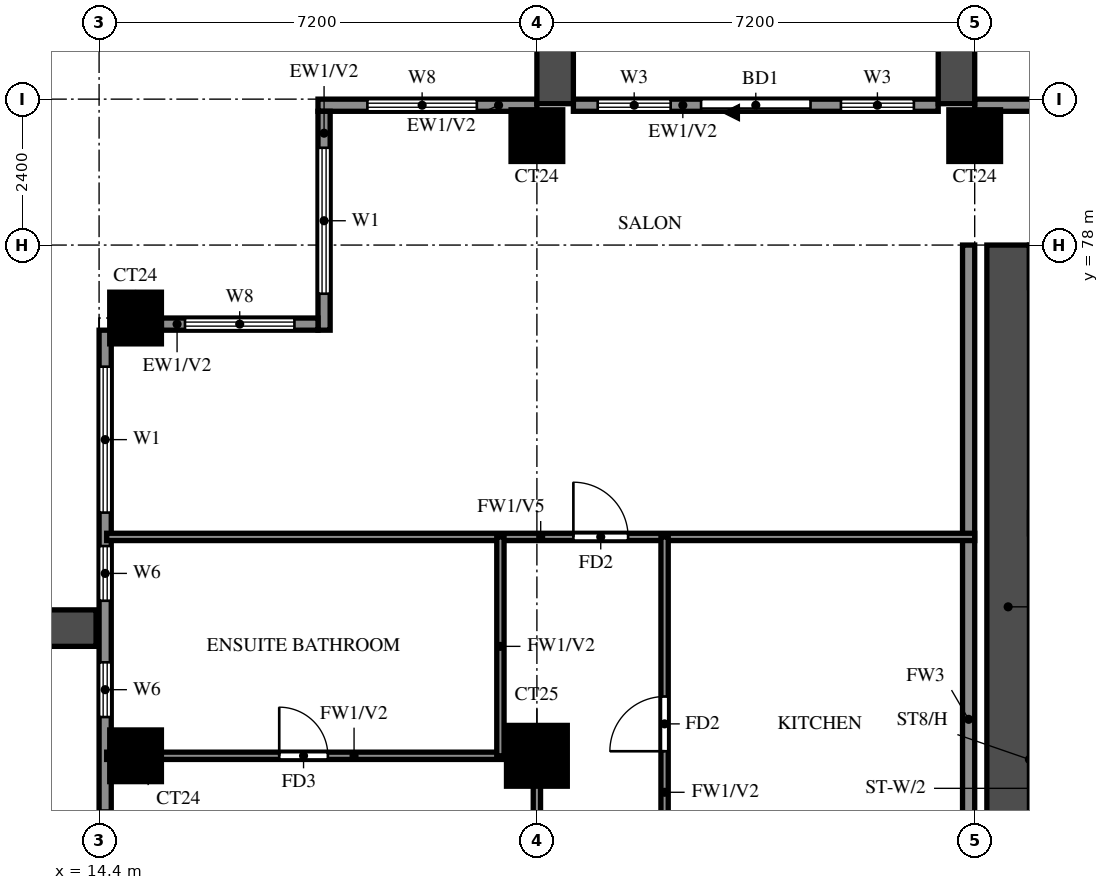
"""IFC4 building model, lengths in metres.
Left out: names, types, materials, properties, quantities, classifications, styles, units other than length and angle.
Written with IfcOpenShell. Run it as: python <this file> out.ifc"""

import sys

from ifc_helpers import new_model, si_unit, direction, frame, frame_2d, origin, origin_2d, place, context, subcontext, project, spatial, rectangle, extrude, source, transform, mapped, element, fill, save


model = new_model("IFC4")
c1 = context("Model", 3, precision=1e-05, world=origin(), true_north=direction((0.0, 1.0)))
c2 = subcontext(c1, "Body", "Model", "MODEL_VIEW")
j1 = project(units=[si_unit("LENGTHUNIT", "METRE"), si_unit("PLANEANGLEUNIT", "RADIAN")], contexts=[c1])
p1 = place(None, origin())
s1 = spatial("IfcSite", under=j1, at=p1, CompositionType="ELEMENT")
p2 = place(p1, origin())
s2 = spatial("IfcBuilding", under=s1, at=p2, CompositionType="ELEMENT")
p3 = place(p2, frame((0.0, 0.0, 150.0)))
s3 = spatial("IfcBuildingStorey", under=s2, at=p3, CompositionType="ELEMENT", Elevation=150.0)
m1 = source(origin(), c2, "Body", "SweptSolid", [
    extrude(rectangle(XDim=0.85, YDim=0.85, at=origin_2d()), origin(), (0.0, 0.0, 1.0), 3.2),
])
p4 = place(p3, frame((15.0, 69.6, 0.0), z_axis=(0.0, 0.0, 1.0), x_axis=(1.0, 0.0, 0.0)))
e1 = element("IfcColumn", 1, at=p4, inside=s3, PredefinedType="COLUMN", context=c2, shape_type="MappedRepresentation", body=[
    mapped(m1, transform((0.0, 0.0, 0.0))),
])
m2 = source(origin(), c2, "Body", "SweptSolid", [
    extrude(rectangle(XDim=1.0, YDim=1.0, at=origin_2d()), origin(), (0.0, 0.0, 1.0), 3.2),
])
p5 = place(p3, frame((21.6, 69.6, 0.0), z_axis=(0.0, 0.0, 1.0), x_axis=(1.0, 0.0, 0.0)))
e2 = element("IfcColumn", 2, at=p5, inside=s3, PredefinedType="COLUMN", context=c2, shape_type="MappedRepresentation", body=[
    mapped(m2, transform((0.0, 0.0, 0.0))),
])
for number, where, z_axis, x_axis in (
    (3, (15.0, 76.8, 0.0), (0.0, 0.0, 1.0), (1.0, 0.0, 0.0)),
    (4, (21.6, 79.8, 0.0), (0.0, 0.0, 1.0), (1.0, 0.0, 0.0)),
    (5, (28.8, 79.8, 0.0), (0.0, 0.0, 1.0), (1.0, 0.0, 0.0)),
):
    element("IfcColumn", number, at=place(p3, frame(where, z_axis=z_axis, x_axis=x_axis)), inside=s3, PredefinedType="COLUMN", context=c2, shape_type="MappedRepresentation", body=[
        mapped(m1, transform((0.0, 0.0, 0.0))),
    ])
p6 = place(p3, frame((29.35, 66.1, 0.0), z_axis=(0.0, 0.0, 1.0), x_axis=(0.0, 1.0, 0.0)))
e6 = element("IfcWall", 6, at=p6, inside=s3, PredefinedType="SHEAR", context=c2, shape_type="SweptSolid", body=[
    extrude(rectangle(XDim=11.9, YDim=0.7, at=frame_2d((5.95, 0.0))), origin(), (0.0, 0.0, 1.0), 3.2),
])
p7 = place(p3, frame((82.6, 80.3, 0.0), z_axis=(0.0, 0.0, 1.0), x_axis=(-1.0, 0.0, 0.0)))
e7 = element("IfcWall", 7, at=p7, inside=s3, PredefinedType="SOLIDWALL", context=c2, shape_type="SweptSolid", body=[
    extrude(rectangle(XDim=53.8, YDim=0.2, at=frame_2d((26.9, 0.0))), origin(), (0.0, 0.0, 1.0), 3.2),
])
p8 = place(p7, frame((0.712, 0.0, 0.6)))
e8 = element("IfcOpeningElement", 8, at=p8, cuts=e7, PredefinedType="OPENING", context=c2, shape_type="SweptSolid", body=[
    extrude(rectangle(XDim=1.8, YDim=2.4, at=frame_2d((0.9, 1.2))), frame((0.0, 0.11, 0.0), z_axis=(0.0, -1.0, 0.0), x_axis=(1.0, 0.0, 0.0)), (0.0, 0.0, 1.0), 0.22),
])
p9 = place(p7, frame((4.358, 0.0, 0.6)))
e9 = element("IfcOpeningElement", 9, at=p9, cuts=e7, PredefinedType="OPENING", context=c2, shape_type="SweptSolid", body=[
    extrude(rectangle(XDim=2.4, YDim=2.4, at=frame_2d((1.2, 1.2))), frame((0.0, 0.11, 0.0), z_axis=(0.0, -1.0, 0.0), x_axis=(1.0, 0.0, 0.0)), (0.0, 0.0, 1.0), 0.22),
])
p10 = place(p7, frame((7.242, 0.0, 0.6)))
e10 = element("IfcOpeningElement", 10, at=p10, cuts=e7, PredefinedType="OPENING", context=c2, shape_type="SweptSolid", body=[
    extrude(rectangle(XDim=2.4, YDim=2.4, at=frame_2d((1.2, 1.2))), frame((0.0, 0.11, 0.0), z_axis=(0.0, -1.0, 0.0), x_axis=(1.0, 0.0, 0.0)), (0.0, 0.0, 1.0), 0.22),
])
p11 = place(p3, frame((28.2, 80.3, 0.0), z_axis=(0.0, 0.0, 1.0), x_axis=(-1.0, 0.0, 0.0)))
e11 = element("IfcWall", 11, at=p11, inside=s3, PredefinedType="SOLIDWALL", context=c2, shape_type="SweptSolid", body=[
    extrude(rectangle(XDim=6.0, YDim=0.2, at=frame_2d((3.0, 0.0))), origin(), (0.0, 0.0, 1.0), 3.2),
])
p12 = place(p11, frame((2.1, 0.0, 0.0)))
e12 = element("IfcOpeningElement", 12, at=p12, cuts=e11, PredefinedType="OPENING", context=c2, shape_type="SweptSolid", body=[
    extrude(rectangle(XDim=1.8, YDim=2.4, at=frame_2d((0.9, 1.2))), frame((0.0, 0.11, 0.0), z_axis=(0.0, -1.0, 0.0), x_axis=(1.0, 0.0, 0.0)), (0.0, 0.0, 1.0), 0.22),
])
p13 = place(p11, frame((0.4, 0.0, 0.6)))
e13 = element("IfcOpeningElement", 13, at=p13, cuts=e11, PredefinedType="OPENING", context=c2, shape_type="SweptSolid", body=[
    extrude(rectangle(XDim=1.2, YDim=2.4, at=frame_2d((0.6, 1.2))), frame((0.0, 0.11, 0.0), z_axis=(0.0, -1.0, 0.0), x_axis=(1.0, 0.0, 0.0)), (0.0, 0.0, 1.0), 0.22),
])
p14 = place(p11, frame((4.4, 0.0, 0.6)))
e14 = element("IfcOpeningElement", 14, at=p14, cuts=e11, PredefinedType="OPENING", context=c2, shape_type="SweptSolid", body=[
    extrude(rectangle(XDim=1.2, YDim=2.4, at=frame_2d((0.6, 1.2))), frame((0.0, 0.11, 0.0), z_axis=(0.0, -1.0, 0.0), x_axis=(1.0, 0.0, 0.0)), (0.0, 0.0, 1.0), 0.22),
])
p15 = place(p3, frame((21.6, 80.3, 0.0), z_axis=(0.0, 0.0, 1.0), x_axis=(-1.0, 0.0, 0.0)))
e15 = element("IfcWall", 15, at=p15, inside=s3, PredefinedType="SOLIDWALL", context=c2, shape_type="SweptSolid", body=[
    extrude(rectangle(XDim=3.6, YDim=0.2, at=frame_2d((1.8, 0.0))), origin(), (0.0, 0.0, 1.0), 3.2),
])
p16 = place(p15, frame((0.988, 0.0, 0.6)))
e16 = element("IfcOpeningElement", 16, at=p16, cuts=e15, PredefinedType="OPENING", context=c2, shape_type="SweptSolid", body=[
    extrude(rectangle(XDim=1.8, YDim=2.4, at=frame_2d((0.9, 1.2))), frame((0.0, 0.11, 0.0), z_axis=(0.0, -1.0, 0.0), x_axis=(1.0, 0.0, 0.0)), (0.0, 0.0, 1.0), 0.22),
])
p17 = place(p3, frame((18.1, 80.2, 0.0), z_axis=(0.0, 0.0, 1.0), x_axis=(0.0, -1.0, 0.0)))
e17 = element("IfcWall", 17, at=p17, inside=s3, PredefinedType="SOLIDWALL", context=c2, shape_type="SweptSolid", body=[
    extrude(rectangle(XDim=3.6, YDim=0.2, at=frame_2d((1.8, 0.0))), origin(), (0.0, 0.0, 1.0), 3.2),
])
p18 = place(p17, frame((0.6, 0.0, 0.6)))
e18 = element("IfcOpeningElement", 18, at=p18, cuts=e17, PredefinedType="OPENING", context=c2, shape_type="SweptSolid", body=[
    extrude(rectangle(XDim=2.4, YDim=2.4, at=frame_2d((1.2, 1.2))), frame((0.0, 0.11, 0.0), z_axis=(0.0, -1.0, 0.0), x_axis=(1.0, 0.0, 0.0)), (0.0, 0.0, 1.0), 0.22),
])
p19 = place(p3, frame((18.0, 76.7, 0.0), z_axis=(0.0, 0.0, 1.0), x_axis=(-1.0, 0.0, 0.0)))
e19 = element("IfcWall", 19, at=p19, inside=s3, PredefinedType="SOLIDWALL", context=c2, shape_type="SweptSolid", body=[
    extrude(rectangle(XDim=2.575, YDim=0.2, at=frame_2d((1.288, 0.0))), origin(), (0.0, 0.0, 1.0), 3.2),
])
p20 = place(p19, frame((0.387, 0.0, 0.6)))
e20 = element("IfcOpeningElement", 20, at=p20, cuts=e19, PredefinedType="OPENING", context=c2, shape_type="SweptSolid", body=[
    extrude(rectangle(XDim=1.8, YDim=2.4, at=frame_2d((0.9, 1.2))), frame((0.0, 0.11, 0.0), z_axis=(0.0, -1.0, 0.0), x_axis=(1.0, 0.0, 0.0)), (0.0, 0.0, 1.0), 0.22),
])
p21 = place(p3, frame((14.5, 76.6, 0.0), z_axis=(0.0, 0.0, 1.0), x_axis=(0.0, -1.0, 0.0)))
e21 = element("IfcWall", 21, at=p21, inside=s3, PredefinedType="SOLIDWALL", context=c2, shape_type="SweptSolid", body=[
    extrude(rectangle(XDim=33.4, YDim=0.2, at=frame_2d((16.7, 0.0))), origin(), (0.0, 0.0, 1.0), 3.2),
])
p22 = place(p21, frame((7.9, 0.0, 0.0)))
e22 = element("IfcOpeningElement", 22, at=p22, cuts=e21, PredefinedType="OPENING", context=c2, shape_type="SweptSolid", body=[
    extrude(rectangle(XDim=1.8, YDim=2.4, at=frame_2d((0.9, 1.2))), frame((0.0, 0.11, 0.0), z_axis=(0.0, -1.0, 0.0), x_axis=(1.0, 0.0, 0.0)), (0.0, 0.0, 1.0), 0.22),
])
p23 = place(p21, frame((22.3, 0.0, 0.0)))
e23 = element("IfcOpeningElement", 23, at=p23, cuts=e21, PredefinedType="OPENING", context=c2, shape_type="SweptSolid", body=[
    extrude(rectangle(XDim=1.8, YDim=2.4, at=frame_2d((0.9, 1.2))), frame((0.0, 0.11, 0.0), z_axis=(0.0, -1.0, 0.0), x_axis=(1.0, 0.0, 0.0)), (0.0, 0.0, 1.0), 0.22),
])
p24 = place(p21, frame((29.887, 0.0, 0.6)))
e24 = element("IfcOpeningElement", 24, at=p24, cuts=e21, PredefinedType="OPENING", context=c2, shape_type="SweptSolid", body=[
    extrude(rectangle(XDim=2.4, YDim=2.4, at=frame_2d((1.2, 1.2))), frame((0.0, 0.11, 0.0), z_axis=(0.0, -1.0, 0.0), x_axis=(1.0, 0.0, 0.0)), (0.0, 0.0, 1.0), 0.22),
])
p25 = place(p21, frame((24.55, 0.0, 0.6)))
e25 = element("IfcOpeningElement", 25, at=p25, cuts=e21, PredefinedType="OPENING", context=c2, shape_type="SweptSolid", body=[
    extrude(rectangle(XDim=0.9, YDim=2.4, at=frame_2d((0.45, 1.2))), frame((0.0, 0.11, 0.0), z_axis=(0.0, -1.0, 0.0), x_axis=(1.0, 0.0, 0.0)), (0.0, 0.0, 1.0), 0.22),
])
p26 = place(p21, frame((26.312, 0.0, 0.6)))
e26 = element("IfcOpeningElement", 26, at=p26, cuts=e21, PredefinedType="OPENING", context=c2, shape_type="SweptSolid", body=[
    extrude(rectangle(XDim=1.8, YDim=2.4, at=frame_2d((0.9, 1.2))), frame((0.0, 0.11, 0.0), z_axis=(0.0, -1.0, 0.0), x_axis=(1.0, 0.0, 0.0)), (0.0, 0.0, 1.0), 0.22),
])
p27 = place(p21, frame((14.988, 0.0, 0.6)))
e27 = element("IfcOpeningElement", 27, at=p27, cuts=e21, PredefinedType="OPENING", context=c2, shape_type="SweptSolid", body=[
    extrude(rectangle(XDim=2.4, YDim=2.4, at=frame_2d((1.2, 1.2))), frame((0.0, 0.11, 0.0), z_axis=(0.0, -1.0, 0.0), x_axis=(1.0, 0.0, 0.0)), (0.0, 0.0, 1.0), 0.22),
])
p28 = place(p21, frame((17.95, 0.0, 1.5)))
e28 = element("IfcOpeningElement", 28, at=p28, cuts=e21, PredefinedType="OPENING", context=c2, shape_type="SweptSolid", body=[
    extrude(rectangle(XDim=0.9, YDim=0.9, at=frame_2d((0.45, 0.45))), frame((0.0, 0.11, 0.0), z_axis=(0.0, -1.0, 0.0), x_axis=(1.0, 0.0, 0.0)), (0.0, 0.0, 1.0), 0.22),
])
p29 = place(p21, frame((19.863, 0.0, 1.5)))
e29 = element("IfcOpeningElement", 29, at=p29, cuts=e21, PredefinedType="OPENING", context=c2, shape_type="SweptSolid", body=[
    extrude(rectangle(XDim=0.9, YDim=0.9, at=frame_2d((0.45, 0.45))), frame((0.0, 0.11, 0.0), z_axis=(0.0, -1.0, 0.0), x_axis=(1.0, 0.0, 0.0)), (0.0, 0.0, 1.0), 0.22),
])
p30 = place(p21, frame((11.913, 0.0, 0.6)))
e30 = element("IfcOpeningElement", 30, at=p30, cuts=e21, PredefinedType="OPENING", context=c2, shape_type="SweptSolid", body=[
    extrude(rectangle(XDim=1.8, YDim=2.4, at=frame_2d((0.9, 1.2))), frame((0.0, 0.11, 0.0), z_axis=(0.0, -1.0, 0.0), x_axis=(1.0, 0.0, 0.0)), (0.0, 0.0, 1.0), 0.22),
])
p31 = place(p21, frame((3.55, 0.0, 1.5)))
e31 = element("IfcOpeningElement", 31, at=p31, cuts=e21, PredefinedType="OPENING", context=c2, shape_type="SweptSolid", body=[
    extrude(rectangle(XDim=0.9, YDim=0.9, at=frame_2d((0.45, 0.45))), frame((0.0, 0.11, 0.0), z_axis=(0.0, -1.0, 0.0), x_axis=(1.0, 0.0, 0.0)), (0.0, 0.0, 1.0), 0.22),
])
p32 = place(p21, frame((5.462, 0.0, 1.5)))
e32 = element("IfcOpeningElement", 32, at=p32, cuts=e21, PredefinedType="OPENING", context=c2, shape_type="SweptSolid", body=[
    extrude(rectangle(XDim=0.9, YDim=0.9, at=frame_2d((0.45, 0.45))), frame((0.0, 0.11, 0.0), z_axis=(0.0, -1.0, 0.0), x_axis=(1.0, 0.0, 0.0)), (0.0, 0.0, 1.0), 0.22),
])
p33 = place(p21, frame((0.6, 0.0, 0.6)))
e33 = element("IfcOpeningElement", 33, at=p33, cuts=e21, PredefinedType="OPENING", context=c2, shape_type="SweptSolid", body=[
    extrude(rectangle(XDim=2.4, YDim=2.4, at=frame_2d((1.2, 1.2))), frame((0.0, 0.11, 0.0), z_axis=(0.0, -1.0, 0.0), x_axis=(1.0, 0.0, 0.0)), (0.0, 0.0, 1.0), 0.22),
])
for number, where, z_axis, x_axis in (
    (34, (28.5, 80.325, 0.0), (0.0, 0.0, 1.0), (0.0, 1.0, 0.0)),
    (35, (21.9, 80.325, 0.0), (0.0, 0.0, 1.0), (0.0, 1.0, 0.0)),
):
    element("IfcWall", number, at=place(p3, frame(where, z_axis=z_axis, x_axis=x_axis)), inside=s3, PredefinedType="SOLIDWALL", context=c2, shape_type="SweptSolid", body=[
        extrude(rectangle(XDim=2.775, YDim=0.6, at=frame_2d((1.388, 0.0))), origin(), (0.0, 0.0, 1.0), 2.85),
    ])
p34 = place(p3, frame((14.35, 71.7, 0.0), z_axis=(0.0, 0.0, 1.0), x_axis=(-1.0, 0.0, 0.0)))
e36 = element("IfcWall", 36, at=p34, inside=s3, PredefinedType="SOLIDWALL", context=c2, shape_type="SweptSolid", body=[
    extrude(rectangle(XDim=2.65, YDim=0.6, at=frame_2d((1.325, 0.0))), origin(), (0.0, 0.0, 1.0), 2.85),
])
p35 = place(p3, frame((28.7, 62.4, 0.0), z_axis=(0.0, 0.0, 1.0), x_axis=(0.0, 1.0, 0.0)))
e37 = element("IfcWall", 37, at=p35, inside=s3, PredefinedType="SOLIDWALL", context=c2, shape_type="SweptSolid", body=[
    extrude(rectangle(XDim=15.6, YDim=0.2, at=frame_2d((7.8, 0.0))), origin(), (0.0, 0.0, 1.0), 3.2),
])
p36 = place(p3, frame((14.525, 69.6, 0.0), z_axis=(0.0, 0.0, 1.0), x_axis=(1.0, 0.0, 0.0)))
e38 = element("IfcWall", 38, at=p36, inside=s3, PredefinedType="PARTITIONING", context=c2, shape_type="SweptSolid", body=[
    extrude(rectangle(XDim=7.075, YDim=0.12, at=frame_2d((3.538, 0.0))), origin(), (0.0, 0.0, 1.0), 3.2),
])
p37 = place(p36, frame((2.837, 0.0, 0.0)))
e39 = element("IfcOpeningElement", 39, at=p37, cuts=e38, PredefinedType="OPENING", context=c2, shape_type="SweptSolid", body=[
    extrude(rectangle(XDim=0.8, YDim=2.1, at=frame_2d((0.4, 1.05))), frame((0.0, 0.07, 0.0), z_axis=(0.0, -1.0, 0.0), x_axis=(1.0, 0.0, 0.0)), (0.0, 0.0, 1.0), 0.14),
])
p38 = place(p3, frame((14.525, 73.2, 0.0), z_axis=(0.0, 0.0, 1.0), x_axis=(1.0, 0.0, 0.0)))
e40 = element("IfcWall", 40, at=p38, inside=s3, PredefinedType="PARTITIONING", context=c2, shape_type="SweptSolid", body=[
    extrude(rectangle(XDim=14.275, YDim=0.12, at=frame_2d((7.138, 0.0))), origin(), (0.0, 0.0, 1.0), 2.3),
])
p39 = place(p38, frame((7.675, 0.0, 0.0)))
e41 = element("IfcOpeningElement", 41, at=p39, cuts=e40, PredefinedType="OPENING", context=c2, shape_type="SweptSolid", body=[
    extrude(rectangle(XDim=0.9, YDim=2.1, at=frame_2d((0.45, 1.05))), frame((0.0, 0.07, 0.0), z_axis=(0.0, -1.0, 0.0), x_axis=(1.0, 0.0, 0.0)), (0.0, 0.0, 1.0), 0.14),
])
p40 = place(p3, frame((21.0, 69.6, 0.0), z_axis=(0.0, 0.0, 1.0), x_axis=(0.0, 1.0, 0.0)))
e42 = element("IfcWall", 42, at=p40, inside=s3, PredefinedType="PARTITIONING", context=c2, shape_type="SweptSolid", body=[
    extrude(rectangle(XDim=3.6, YDim=0.12, at=frame_2d((1.8, 0.0))), origin(), (0.0, 0.0, 1.0), 3.2),
])
p41 = place(p3, frame((21.6, 58.8, 0.0), z_axis=(0.0, 0.0, 1.0), x_axis=(0.0, 1.0, 0.0)))
e43 = element("IfcWall", 43, at=p41, inside=s3, PredefinedType="PARTITIONING", context=c2, shape_type="SweptSolid", body=[
    extrude(rectangle(XDim=10.8, YDim=0.12, at=frame_2d((5.4, 0.0))), origin(), (0.0, 0.0, 1.0), 3.2),
])
p42 = place(p41, frame((1.35, 0.0, 0.0)))
e44 = element("IfcOpeningElement", 44, at=p42, cuts=e43, PredefinedType="OPENING", context=c2, shape_type="SweptSolid", body=[
    extrude(rectangle(XDim=0.9, YDim=2.1, at=frame_2d((0.45, 1.05))), frame((0.0, 0.07, 0.0), z_axis=(0.0, -1.0, 0.0), x_axis=(1.0, 0.0, 0.0)), (0.0, 0.0, 1.0), 0.14),
])
p43 = place(p41, frame((4.95, 0.0, 0.0)))
e45 = element("IfcOpeningElement", 45, at=p43, cuts=e43, PredefinedType="OPENING", context=c2, shape_type="SweptSolid", body=[
    extrude(rectangle(XDim=0.9, YDim=2.1, at=frame_2d((0.45, 1.05))), frame((0.0, 0.07, 0.0), z_axis=(0.0, -1.0, 0.0), x_axis=(1.0, 0.0, 0.0)), (0.0, 0.0, 1.0), 0.14),
])
p44 = place(p41, frame((8.55, 0.0, 0.0)))
e46 = element("IfcOpeningElement", 46, at=p44, cuts=e43, PredefinedType="OPENING", context=c2, shape_type="SweptSolid", body=[
    extrude(rectangle(XDim=0.9, YDim=2.1, at=frame_2d((0.45, 1.05))), frame((0.0, 0.07, 0.0), z_axis=(0.0, -1.0, 0.0), x_axis=(1.0, 0.0, 0.0)), (0.0, 0.0, 1.0), 0.14),
])
p45 = place(p3, frame((23.7, 64.8, 0.0), z_axis=(0.0, 0.0, 1.0), x_axis=(0.0, 1.0, 0.0)))
e47 = element("IfcWall", 47, at=p45, inside=s3, PredefinedType="PARTITIONING", context=c2, shape_type="SweptSolid", body=[
    extrude(rectangle(XDim=8.4, YDim=0.12, at=frame_2d((4.2, 0.0))), origin(), (0.0, 0.0, 1.0), 3.2),
])
p46 = place(p45, frame((4.875, 0.0, 0.0)))
e48 = element("IfcOpeningElement", 48, at=p46, cuts=e47, PredefinedType="OPENING", context=c2, shape_type="SweptSolid", body=[
    extrude(rectangle(XDim=0.9, YDim=2.1, at=frame_2d((0.45, 1.05))), frame((0.0, 0.07, 0.0), z_axis=(0.0, -1.0, 0.0), x_axis=(1.0, 0.0, 0.0)), (0.0, 0.0, 1.0), 0.14),
])
p47 = place(p12, origin())
e49 = element("IfcDoor", 49, at=p47, inside=s3, OperationType="DOUBLE_DOOR_SLIDING", PredefinedType="DOOR", context=c2, shape_type="SweptSolid", body=[
    extrude(rectangle(XDim=1.8, YDim=2.4, at=frame_2d((0.9, 1.2))), frame((0.0, 0.025, 0.0), z_axis=(0.0, -1.0, 0.0), x_axis=(1.0, 0.0, 0.0)), (0.0, 0.0, 1.0), 0.05),
])
fill(e12, e49)
p48 = place(p13, origin())
e50 = element("IfcWindow", 50, at=p48, inside=s3, PartitioningType="SINGLE_PANEL", PredefinedType="WINDOW", context=c2, shape_type="SweptSolid", body=[
    extrude(rectangle(XDim=1.2, YDim=2.4, at=frame_2d((0.6, 1.2))), frame((0.0, 0.03, 0.0), z_axis=(0.0, -1.0, 0.0), x_axis=(1.0, 0.0, 0.0)), (0.0, 0.0, 1.0), 0.06),
])
fill(e13, e50)
p49 = place(p14, origin())
e51 = element("IfcWindow", 51, at=p49, inside=s3, PartitioningType="SINGLE_PANEL", PredefinedType="WINDOW", context=c2, shape_type="SweptSolid", body=[
    extrude(rectangle(XDim=1.2, YDim=2.4, at=frame_2d((0.6, 1.2))), frame((0.0, 0.03, 0.0), z_axis=(0.0, -1.0, 0.0), x_axis=(1.0, 0.0, 0.0)), (0.0, 0.0, 1.0), 0.06),
])
fill(e14, e51)
p50 = place(p16, origin())
e52 = element("IfcWindow", 52, at=p50, inside=s3, PartitioningType="DOUBLE_PANEL_VERTICAL", PredefinedType="WINDOW", context=c2, shape_type="SweptSolid", body=[
    extrude(rectangle(XDim=1.8, YDim=2.4, at=frame_2d((0.9, 1.2))), frame((0.0, 0.03, 0.0), z_axis=(0.0, -1.0, 0.0), x_axis=(1.0, 0.0, 0.0)), (0.0, 0.0, 1.0), 0.06),
])
fill(e16, e52)
p51 = place(p18, origin())
e53 = element("IfcWindow", 53, at=p51, inside=s3, PartitioningType="DOUBLE_PANEL_VERTICAL", PredefinedType="WINDOW", context=c2, shape_type="SweptSolid", body=[
    extrude(rectangle(XDim=2.4, YDim=2.4, at=frame_2d((1.2, 1.2))), frame((0.0, 0.03, 0.0), z_axis=(0.0, -1.0, 0.0), x_axis=(1.0, 0.0, 0.0)), (0.0, 0.0, 1.0), 0.06),
])
fill(e18, e53)
p52 = place(p20, origin())
e54 = element("IfcWindow", 54, at=p52, inside=s3, PartitioningType="DOUBLE_PANEL_VERTICAL", PredefinedType="WINDOW", context=c2, shape_type="SweptSolid", body=[
    extrude(rectangle(XDim=1.8, YDim=2.4, at=frame_2d((0.9, 1.2))), frame((0.0, 0.03, 0.0), z_axis=(0.0, -1.0, 0.0), x_axis=(1.0, 0.0, 0.0)), (0.0, 0.0, 1.0), 0.06),
])
fill(e20, e54)
p53 = place(p22, origin())
e55 = element("IfcDoor", 55, at=p53, inside=s3, OperationType="DOUBLE_DOOR_SLIDING", PredefinedType="DOOR", context=c2, shape_type="SweptSolid", body=[
    extrude(rectangle(XDim=1.8, YDim=2.4, at=frame_2d((0.9, 1.2))), frame((0.0, 0.025, 0.0), z_axis=(0.0, -1.0, 0.0), x_axis=(1.0, 0.0, 0.0)), (0.0, 0.0, 1.0), 0.05),
])
fill(e22, e55)
p54 = place(p31, origin())
e56 = element("IfcWindow", 56, at=p54, inside=s3, PartitioningType="SINGLE_PANEL", PredefinedType="WINDOW", context=c2, shape_type="SweptSolid", body=[
    extrude(rectangle(XDim=0.9, YDim=0.9, at=frame_2d((0.45, 0.45))), frame((0.0, 0.03, 0.0), z_axis=(0.0, -1.0, 0.0), x_axis=(1.0, 0.0, 0.0)), (0.0, 0.0, 1.0), 0.06),
])
fill(e31, e56)
p55 = place(p32, origin())
e57 = element("IfcWindow", 57, at=p55, inside=s3, PartitioningType="SINGLE_PANEL", PredefinedType="WINDOW", context=c2, shape_type="SweptSolid", body=[
    extrude(rectangle(XDim=0.9, YDim=0.9, at=frame_2d((0.45, 0.45))), frame((0.0, 0.03, 0.0), z_axis=(0.0, -1.0, 0.0), x_axis=(1.0, 0.0, 0.0)), (0.0, 0.0, 1.0), 0.06),
])
fill(e32, e57)
p56 = place(p33, origin())
e58 = element("IfcWindow", 58, at=p56, inside=s3, PartitioningType="DOUBLE_PANEL_VERTICAL", PredefinedType="WINDOW", context=c2, shape_type="SweptSolid", body=[
    extrude(rectangle(XDim=2.4, YDim=2.4, at=frame_2d((1.2, 1.2))), frame((0.0, 0.03, 0.0), z_axis=(0.0, -1.0, 0.0), x_axis=(1.0, 0.0, 0.0)), (0.0, 0.0, 1.0), 0.06),
])
fill(e33, e58)
p57 = place(p37, origin())
e59 = element("IfcDoor", 59, at=p57, inside=s3, OperationType="SINGLE_SWING_LEFT", PredefinedType="DOOR", context=c2, shape_type="SweptSolid", body=[
    extrude(rectangle(XDim=0.8, YDim=2.1, at=frame_2d((0.4, 1.05))), frame((0.0, 0.025, 0.0), z_axis=(0.0, -1.0, 0.0), x_axis=(1.0, 0.0, 0.0)), (0.0, 0.0, 1.0), 0.05),
])
fill(e39, e59)
p58 = place(p39, origin())
e60 = element("IfcDoor", 60, at=p58, inside=s3, OperationType="SINGLE_SWING_LEFT", PredefinedType="DOOR", context=c2, shape_type="SweptSolid", body=[
    extrude(rectangle(XDim=0.9, YDim=2.1, at=frame_2d((0.45, 1.05))), frame((0.0, 0.025, 0.0), z_axis=(0.0, -1.0, 0.0), x_axis=(1.0, 0.0, 0.0)), (0.0, 0.0, 1.0), 0.05),
])
fill(e41, e60)
p59 = place(p46, origin())
e61 = element("IfcDoor", 61, at=p59, inside=s3, OperationType="SINGLE_SWING_LEFT", PredefinedType="DOOR", context=c2, shape_type="SweptSolid", body=[
    extrude(rectangle(XDim=0.9, YDim=2.1, at=frame_2d((0.45, 1.05))), frame((0.0, 0.025, 0.0), z_axis=(0.0, -1.0, 0.0), x_axis=(1.0, 0.0, 0.0)), (0.0, 0.0, 1.0), 0.05),
])
fill(e48, e61)
save(model, sys.argv[1])
